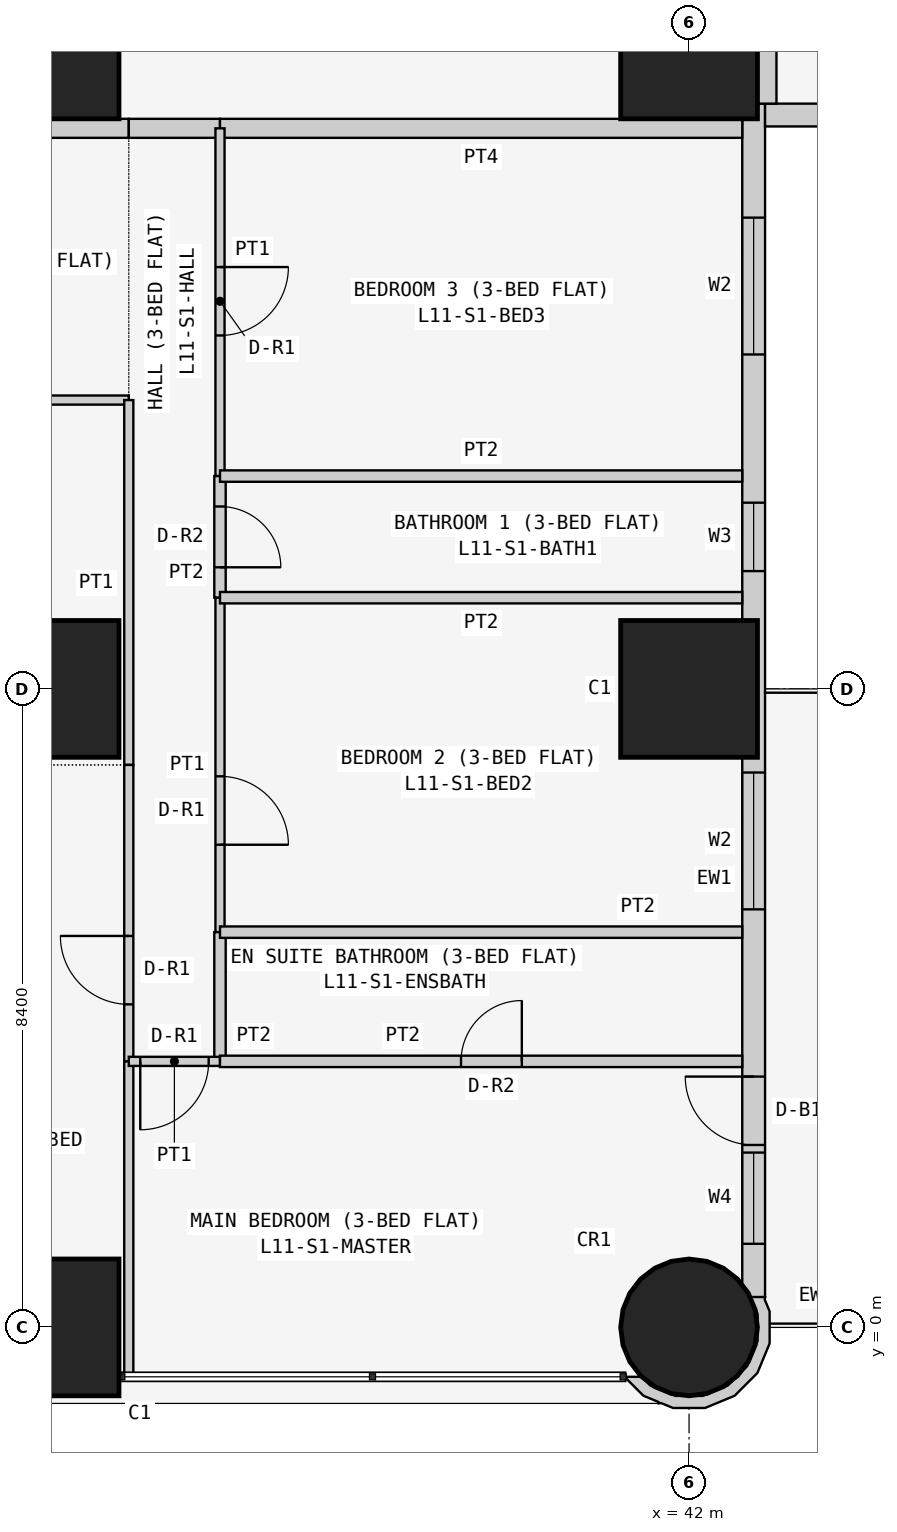
"""IFC4 building model, lengths in metres.
Left out: names, types, materials, properties, quantities, classifications, styles, units other than length and angle.
Written with IfcOpenShell. Run it as: python <this file> out.ifc"""

import sys

from ifc_helpers import new_model, si_unit, direction, frame, frame_2d, origin, origin_2d, place, context, subcontext, project, spatial, polyline, rectangle, circle, outline, extrude, element, fill, save


model = new_model("IFC4")
c1 = context("Model", 3, precision=1e-05, world=origin(), true_north=direction((0.0, 1.0)))
c2 = subcontext(c1, "Body", "Model", "MODEL_VIEW")
j1 = project(units=[si_unit("LENGTHUNIT", "METRE"), si_unit("PLANEANGLEUNIT", "RADIAN")], contexts=[c1])
p1 = place(None, origin())
s1 = spatial("IfcSite", under=j1, at=p1, CompositionType="ELEMENT")
p2 = place(p1, origin())
s2 = spatial("IfcBuilding", under=s1, at=p2, CompositionType="ELEMENT")
p3 = place(p2, frame((0.0, 0.0, 48.9)))
s3 = spatial("IfcBuildingStorey", under=s2, at=p3, CompositionType="ELEMENT", Elevation=48.9)
for number, where, z_axis, x_axis in (
    (1, (33.6, 0.0, 0.0), (0.0, 0.0, 1.0), (1.0, 0.0, 0.0)),
    (2, (33.6, 8.4, 0.0), (0.0, 0.0, 1.0), (1.0, 0.0, 0.0)),
    (3, (33.6, 16.8, 0.0), (0.0, 0.0, 1.0), (1.0, 0.0, 0.0)),
):
    element("IfcColumn", number, at=place(p3, frame(where, z_axis=z_axis, x_axis=x_axis)), inside=s3, PredefinedType="COLUMN", context=c2, shape_type="SweptSolid", body=[
        extrude(rectangle(XDim=1.8, YDim=1.8, at=origin_2d()), origin(), (0.0, 0.0, 1.0), 3.6),
    ])
p4 = place(p3, frame((42.0, 0.0, 0.0), z_axis=(0.0, 0.0, 1.0), x_axis=(1.0, 0.0, 0.0)))
e4 = element("IfcColumn", 4, at=p4, inside=s3, PredefinedType="COLUMN", context=c2, shape_type="SweptSolid", body=[
    extrude(circle(Radius=0.9, at=origin_2d()), origin(), (0.0, 0.0, 1.0), 3.6),
])
for number, where, z_axis, x_axis in (
    (5, (42.0, 8.4, 0.0), (0.0, 0.0, 1.0), (1.0, 0.0, 0.0)),
    (6, (42.0, 16.8, 0.0), (0.0, 0.0, 1.0), (1.0, 0.0, 0.0)),
):
    element("IfcColumn", number, at=place(p3, frame(where, z_axis=z_axis, x_axis=x_axis)), inside=s3, PredefinedType="COLUMN", context=c2, shape_type="SweptSolid", body=[
        extrude(rectangle(XDim=1.8, YDim=1.8, at=origin_2d()), origin(), (0.0, 0.0, 1.0), 3.6),
    ])
p5 = place(p3, frame((42.85, 0.4, 0.0), z_axis=(0.0, 0.0, 1.0), x_axis=(0.0, 1.0, 0.0)))
e7 = element("IfcWall", 7, at=p5, inside=s3, PredefinedType="SOLIDWALL", context=c2, shape_type="SweptSolid", body=[
    extrude(rectangle(XDim=15.7, YDim=0.3, at=frame_2d((7.85, 0.0))), origin(), (0.0, 0.0, 1.0), 3.45),
])
p6 = place(p5, frame((12.4, 0.0, 0.9)))
e8 = element("IfcOpeningElement", 8, at=p6, cuts=e7, PredefinedType="OPENING", context=c2, shape_type="SweptSolid", body=[
    extrude(rectangle(XDim=1.8, YDim=1.5, at=frame_2d((0.9, 0.75))), frame((0.0, 0.16, 0.0), z_axis=(0.0, -1.0, 0.0), x_axis=(1.0, 0.0, 0.0)), (0.0, 0.0, 1.0), 0.32),
])
p7 = place(p5, frame((9.55, 0.0, 1.5)))
e9 = element("IfcOpeningElement", 9, at=p7, cuts=e7, PredefinedType="OPENING", context=c2, shape_type="SweptSolid", body=[
    extrude(rectangle(XDim=0.9, YDim=0.7, at=frame_2d((0.45, 0.35))), frame((0.0, 0.16, 0.0), z_axis=(0.0, -1.0, 0.0), x_axis=(1.0, 0.0, 0.0)), (0.0, 0.0, 1.0), 0.32),
])
p8 = place(p5, frame((5.1, 0.0, 0.9)))
e10 = element("IfcOpeningElement", 10, at=p8, cuts=e7, PredefinedType="OPENING", context=c2, shape_type="SweptSolid", body=[
    extrude(rectangle(XDim=1.8, YDim=1.5, at=frame_2d((0.9, 0.75))), frame((0.0, 0.16, 0.0), z_axis=(0.0, -1.0, 0.0), x_axis=(1.0, 0.0, 0.0)), (0.0, 0.0, 1.0), 0.32),
])
p9 = place(p5, frame((2.0, 0.0, 0.0)))
e11 = element("IfcOpeningElement", 11, at=p9, cuts=e7, PredefinedType="OPENING", context=c2, shape_type="SweptSolid", body=[
    extrude(rectangle(XDim=0.9, YDim=2.4, at=frame_2d((0.45, 1.2))), frame((0.0, 0.16, 0.0), z_axis=(0.0, -1.0, 0.0), x_axis=(1.0, 0.0, 0.0)), (0.0, 0.0, 1.0), 0.32),
])
p10 = place(p5, frame((0.7, 0.0, 0.9)))
e12 = element("IfcOpeningElement", 12, at=p10, cuts=e7, PredefinedType="OPENING", context=c2, shape_type="SweptSolid", body=[
    extrude(rectangle(XDim=1.2, YDim=1.5, at=frame_2d((0.6, 0.75))), frame((0.0, 0.16, 0.0), z_axis=(0.0, -1.0, 0.0), x_axis=(1.0, 0.0, 0.0)), (0.0, 0.0, 1.0), 0.32),
])
p11 = place(p3, frame((43.0, 15.95, 0.0), z_axis=(0.0, 0.0, 1.0), x_axis=(1.0, 0.0, 0.0)))
e13 = element("IfcWall", 13, at=p11, inside=s3, PredefinedType="SOLIDWALL", context=c2, shape_type="SweptSolid", body=[
    extrude(rectangle(XDim=15.4, YDim=0.3, at=frame_2d((7.7, 0.0))), origin(), (0.0, 0.0, 1.0), 3.45),
])
p12 = place(p11, frame((1.2, 0.0, 0.9)))
e14 = element("IfcOpeningElement", 14, at=p12, cuts=e13, PredefinedType="OPENING", context=c2, shape_type="SweptSolid", body=[
    extrude(rectangle(XDim=1.8, YDim=1.5, at=frame_2d((0.9, 0.75))), frame((0.0, 0.16, 0.0), z_axis=(0.0, -1.0, 0.0), x_axis=(1.0, 0.0, 0.0)), (0.0, 0.0, 1.0), 0.32),
])
p13 = place(p11, frame((4.95, 0.0, 1.5)))
e15 = element("IfcOpeningElement", 15, at=p13, cuts=e13, PredefinedType="OPENING", context=c2, shape_type="SweptSolid", body=[
    extrude(rectangle(XDim=0.9, YDim=0.7, at=frame_2d((0.45, 0.35))), frame((0.0, 0.16, 0.0), z_axis=(0.0, -1.0, 0.0), x_axis=(1.0, 0.0, 0.0)), (0.0, 0.0, 1.0), 0.32),
])
p14 = place(p11, frame((8.5, 0.0, 0.9)))
e16 = element("IfcOpeningElement", 16, at=p14, cuts=e13, PredefinedType="OPENING", context=c2, shape_type="SweptSolid", body=[
    extrude(rectangle(XDim=1.8, YDim=1.5, at=frame_2d((0.9, 0.75))), frame((0.0, 0.16, 0.0), z_axis=(0.0, -1.0, 0.0), x_axis=(1.0, 0.0, 0.0)), (0.0, 0.0, 1.0), 0.32),
])
p15 = place(p11, frame((12.5, 0.0, 0.0)))
e17 = element("IfcOpeningElement", 17, at=p15, cuts=e13, PredefinedType="OPENING", context=c2, shape_type="SweptSolid", body=[
    extrude(rectangle(XDim=0.9, YDim=2.4, at=frame_2d((0.45, 1.2))), frame((0.0, 0.16, 0.0), z_axis=(0.0, -1.0, 0.0), x_axis=(1.0, 0.0, 0.0)), (0.0, 0.0, 1.0), 0.32),
])
p16 = place(p11, frame((13.5, 0.0, 0.9)))
e18 = element("IfcOpeningElement", 18, at=p16, cuts=e13, PredefinedType="OPENING", context=c2, shape_type="SweptSolid", body=[
    extrude(rectangle(XDim=1.2, YDim=1.5, at=frame_2d((0.6, 0.75))), frame((0.0, 0.16, 0.0), z_axis=(0.0, -1.0, 0.0), x_axis=(1.0, 0.0, 0.0)), (0.0, 0.0, 1.0), 0.32),
])
p17 = place(p3, frame((41.233, -0.611, 0.0), z_axis=(0.0, 0.0, 1.0), x_axis=(0.377204953059, -0.926129809145, 0.0)))
e19 = element("IfcWall", 19, at=p17, inside=s3, PredefinedType="SOLIDWALL", context=c2, shape_type="SweptSolid", body=[
    extrude(outline(polyline([(0.319, 1.843), (-0.072, 2.001), (-0.24, 2.001), (-0.269, 2.017), (-0.37, 1.841), (-0.102, 1.842), (0.23, 1.707), (0.485, 1.455), (0.624, 1.125), (0.626, 0.766), (0.49, 0.434), (0.239, 0.179), (0.09, 0.117), (0.011, -0.078), (0.024, -0.083), (0.33, 0.045), (0.48, 0.197), (0.499, 0.193), (0.508, 0.225), (0.626, 0.345), (0.785, 0.736), (0.782, 1.157), (0.619, 1.546), (0.319, 1.843)])), origin(), (0.0, 0.0, 1.0), 3.45),
])
p18 = place(p3, frame((43.025, 22.971, 0.0), z_axis=(0.0, 0.0, 1.0), x_axis=(0.0, -1.0, 0.0)))
e20 = element("IfcWall", 20, at=p18, inside=s3, PredefinedType="PARTITIONING", context=c2, shape_type="SweptSolid", body=[
    extrude(rectangle(XDim=6.871, YDim=0.25, at=frame_2d((3.436, 0.0))), origin(), (0.0, 0.0, 1.0), 3.45),
])
p19 = place(p3, frame((34.629, 15.775, 0.0), z_axis=(0.0, 0.0, 1.0), x_axis=(-1.0, 0.0, 0.0)))
e21 = element("IfcWall", 21, at=p19, inside=s3, PredefinedType="PARTITIONING", context=c2, shape_type="SweptSolid", body=[
    extrude(rectangle(XDim=5.229, YDim=0.25, at=frame_2d((2.615, 0.0))), origin(), (0.0, 0.0, 1.0), 3.45),
])
p20 = place(p19, frame((2.129, 0.0, 0.0)))
e22 = element("IfcOpeningElement", 22, at=p20, cuts=e21, PredefinedType="OPENING", context=c2, shape_type="SweptSolid", body=[
    extrude(rectangle(XDim=1.0, YDim=2.1, at=frame_2d((0.5, 1.05))), frame((0.0, 0.135, 0.0), z_axis=(0.0, -1.0, 0.0), x_axis=(1.0, 0.0, 0.0)), (0.0, 0.0, 1.0), 0.27),
])
p21 = place(p3, frame((35.829, 15.775, 0.0), z_axis=(0.0, 0.0, 1.0), x_axis=(-1.0, 0.0, 0.0)))
e23 = element("IfcWall", 23, at=p21, inside=s3, PredefinedType="PARTITIONING", context=c2, shape_type="SweptSolid", body=[
    extrude(rectangle(XDim=1.2, YDim=0.25, at=frame_2d((0.6, 0.0))), origin(), (0.0, 0.0, 1.0), 3.45),
])
p22 = place(p3, frame((42.7, 15.775, 0.0), z_axis=(0.0, 0.0, 1.0), x_axis=(-1.0, 0.0, 0.0)))
e24 = element("IfcWall", 24, at=p22, inside=s3, PredefinedType="PARTITIONING", context=c2, shape_type="SweptSolid", body=[
    extrude(rectangle(XDim=6.871, YDim=0.25, at=frame_2d((3.436, 0.0))), origin(), (0.0, 0.0, 1.0), 3.45),
])
p23 = place(p3, frame((29.4, 12.2, 0.0), z_axis=(0.0, 0.0, 1.0), x_axis=(1.0, 0.0, 0.0)))
e25 = element("IfcWall", 25, at=p23, inside=s3, PredefinedType="PARTITIONING", context=c2, shape_type="SweptSolid", body=[
    extrude(rectangle(XDim=5.229, YDim=0.12, at=frame_2d((2.615, 0.0))), origin(), (0.0, 0.0, 1.0), 3.45),
])
p24 = place(p23, frame((1.05, 0.0, 0.0)))
e26 = element("IfcOpeningElement", 26, at=p24, cuts=e25, PredefinedType="OPENING", context=c2, shape_type="SweptSolid", body=[
    extrude(rectangle(XDim=0.9, YDim=2.1, at=frame_2d((0.45, 1.05))), frame((0.0, 0.07, 0.0), z_axis=(0.0, -1.0, 0.0), x_axis=(1.0, 0.0, 0.0)), (0.0, 0.0, 1.0), 0.14),
])
p25 = place(p3, frame((34.629, 7.4, 0.0), z_axis=(0.0, 0.0, 1.0), x_axis=(0.0, 1.0, 0.0)))
e27 = element("IfcWall", 27, at=p25, inside=s3, PredefinedType="PARTITIONING", context=c2, shape_type="SweptSolid", body=[
    extrude(rectangle(XDim=4.8, YDim=0.12, at=frame_2d((2.4, 0.0))), origin(), (0.0, 0.0, 1.0), 3.45),
])
p26 = place(p3, frame((34.629, 3.5, 0.0), z_axis=(0.0, 0.0, 1.0), x_axis=(0.0, 1.0, 0.0)))
e28 = element("IfcWall", 28, at=p26, inside=s3, PredefinedType="PARTITIONING", context=c2, shape_type="SweptSolid", body=[
    extrude(rectangle(XDim=3.9, YDim=0.12, at=frame_2d((1.95, 0.0))), origin(), (0.0, 0.0, 1.0), 3.45),
])
p27 = place(p26, frame((0.75, 0.0, 0.0)))
e29 = element("IfcOpeningElement", 29, at=p27, cuts=e28, PredefinedType="OPENING", context=c2, shape_type="SweptSolid", body=[
    extrude(rectangle(XDim=0.9, YDim=2.1, at=frame_2d((0.45, 1.05))), frame((0.0, 0.07, 0.0), z_axis=(0.0, -1.0, 0.0), x_axis=(1.0, 0.0, 0.0)), (0.0, 0.0, 1.0), 0.14),
])
p28 = place(p3, frame((34.629, -0.65, 0.0), z_axis=(0.0, 0.0, 1.0), x_axis=(0.0, 1.0, 0.0)))
e30 = element("IfcWall", 30, at=p28, inside=s3, PredefinedType="PARTITIONING", context=c2, shape_type="SweptSolid", body=[
    extrude(rectangle(XDim=4.15, YDim=0.12, at=frame_2d((2.075, 0.0))), origin(), (0.0, 0.0, 1.0), 3.45),
])
p29 = place(p3, frame((35.829, 11.2, 0.0), z_axis=(0.0, 0.0, 1.0), x_axis=(0.0, 1.0, 0.0)))
e31 = element("IfcWall", 31, at=p29, inside=s3, PredefinedType="PARTITIONING", context=c2, shape_type="SweptSolid", body=[
    extrude(rectangle(XDim=4.575, YDim=0.12, at=frame_2d((2.288, 0.0))), origin(), (0.0, 0.0, 1.0), 3.45),
])
p30 = place(p29, frame((1.85, 0.0, 0.0)))
e32 = element("IfcOpeningElement", 32, at=p30, cuts=e31, PredefinedType="OPENING", context=c2, shape_type="SweptSolid", body=[
    extrude(rectangle(XDim=0.9, YDim=2.1, at=frame_2d((0.45, 1.05))), frame((0.0, 0.07, 0.0), z_axis=(0.0, -1.0, 0.0), x_axis=(1.0, 0.0, 0.0)), (0.0, 0.0, 1.0), 0.14),
])
p31 = place(p3, frame((35.829, 9.6, 0.0), z_axis=(0.0, 0.0, 1.0), x_axis=(0.0, 1.0, 0.0)))
e33 = element("IfcWall", 33, at=p31, inside=s3, PredefinedType="PARTITIONING", context=c2, shape_type="SweptSolid", body=[
    extrude(rectangle(XDim=1.6, YDim=0.15, at=frame_2d((0.8, 0.0))), origin(), (0.0, 0.0, 1.0), 3.45),
])
p32 = place(p31, frame((0.4, 0.0, 0.0)))
e34 = element("IfcOpeningElement", 34, at=p32, cuts=e33, PredefinedType="OPENING", context=c2, shape_type="SweptSolid", body=[
    extrude(rectangle(XDim=0.8, YDim=2.1, at=frame_2d((0.4, 1.05))), frame((0.0, 0.085, 0.0), z_axis=(0.0, -1.0, 0.0), x_axis=(1.0, 0.0, 0.0)), (0.0, 0.0, 1.0), 0.17),
])
p33 = place(p3, frame((35.829, 5.2, 0.0), z_axis=(0.0, 0.0, 1.0), x_axis=(0.0, 1.0, 0.0)))
e35 = element("IfcWall", 35, at=p33, inside=s3, PredefinedType="PARTITIONING", context=c2, shape_type="SweptSolid", body=[
    extrude(rectangle(XDim=4.4, YDim=0.12, at=frame_2d((2.2, 0.0))), origin(), (0.0, 0.0, 1.0), 3.45),
])
p34 = place(p33, frame((1.15, 0.0, 0.0)))
e36 = element("IfcOpeningElement", 36, at=p34, cuts=e35, PredefinedType="OPENING", context=c2, shape_type="SweptSolid", body=[
    extrude(rectangle(XDim=0.9, YDim=2.1, at=frame_2d((0.45, 1.05))), frame((0.0, 0.07, 0.0), z_axis=(0.0, -1.0, 0.0), x_axis=(1.0, 0.0, 0.0)), (0.0, 0.0, 1.0), 0.14),
])
p35 = place(p3, frame((35.829, 3.5, 0.0), z_axis=(0.0, 0.0, 1.0), x_axis=(0.0, 1.0, 0.0)))
e37 = element("IfcWall", 37, at=p35, inside=s3, PredefinedType="PARTITIONING", context=c2, shape_type="SweptSolid", body=[
    extrude(rectangle(XDim=1.7, YDim=0.15, at=frame_2d((0.85, 0.0))), origin(), (0.0, 0.0, 1.0), 3.45),
])
p36 = place(p3, frame((34.629, 3.5, 0.0), z_axis=(0.0, 0.0, 1.0), x_axis=(1.0, 0.0, 0.0)))
e38 = element("IfcWall", 38, at=p36, inside=s3, PredefinedType="PARTITIONING", context=c2, shape_type="SweptSolid", body=[
    extrude(rectangle(XDim=1.2, YDim=0.12, at=frame_2d((0.6, 0.0))), origin(), (0.0, 0.0, 1.0), 3.45),
])
p37 = place(p36, frame((0.151, 0.0, 0.0)))
e39 = element("IfcOpeningElement", 39, at=p37, cuts=e38, PredefinedType="OPENING", context=c2, shape_type="SweptSolid", body=[
    extrude(rectangle(XDim=0.9, YDim=2.1, at=frame_2d((0.45, 1.05))), frame((0.0, 0.07, 0.0), z_axis=(0.0, -1.0, 0.0), x_axis=(1.0, 0.0, 0.0)), (0.0, 0.0, 1.0), 0.14),
])
for number, where, z_axis, x_axis in (
    (40, (35.829, 11.2, 0.0), (0.0, 0.0, 1.0), (1.0, 0.0, 0.0)),
    (41, (35.829, 9.6, 0.0), (0.0, 0.0, 1.0), (1.0, 0.0, 0.0)),
    (42, (35.829, 5.2, 0.0), (0.0, 0.0, 1.0), (1.0, 0.0, 0.0)),
):
    element("IfcWall", number, at=place(p3, frame(where, z_axis=z_axis, x_axis=x_axis)), inside=s3, PredefinedType="PARTITIONING", context=c2, shape_type="SweptSolid", body=[
        extrude(rectangle(XDim=6.871, YDim=0.15, at=frame_2d((3.436, 0.0))), origin(), (0.0, 0.0, 1.0), 3.45),
    ])
p38 = place(p3, frame((35.829, 3.5, 0.0), z_axis=(0.0, 0.0, 1.0), x_axis=(1.0, 0.0, 0.0)))
e43 = element("IfcWall", 43, at=p38, inside=s3, PredefinedType="PARTITIONING", context=c2, shape_type="SweptSolid", body=[
    extrude(rectangle(XDim=6.871, YDim=0.15, at=frame_2d((3.436, 0.0))), origin(), (0.0, 0.0, 1.0), 3.45),
])
p39 = place(p38, frame((3.171, 0.0, 0.0)))
e44 = element("IfcOpeningElement", 44, at=p39, cuts=e43, PredefinedType="OPENING", context=c2, shape_type="SweptSolid", body=[
    extrude(rectangle(XDim=0.8, YDim=2.1, at=frame_2d((0.4, 1.05))), frame((0.0, 0.085, 0.0), z_axis=(0.0, -1.0, 0.0), x_axis=(1.0, 0.0, 0.0)), (0.0, 0.0, 1.0), 0.17),
])
p40 = place(p6, origin())
e45 = element("IfcWindow", 45, at=p40, inside=s3, PartitioningType="SINGLE_PANEL", PredefinedType="WINDOW", context=c2, shape_type="SweptSolid", body=[
    extrude(rectangle(XDim=1.8, YDim=1.5, at=frame_2d((0.9, 0.75))), frame((0.0, 0.03, 0.0), z_axis=(0.0, -1.0, 0.0), x_axis=(1.0, 0.0, 0.0)), (0.0, 0.0, 1.0), 0.06),
])
fill(e8, e45)
p41 = place(p7, origin())
e46 = element("IfcWindow", 46, at=p41, inside=s3, PartitioningType="SINGLE_PANEL", PredefinedType="WINDOW", context=c2, shape_type="SweptSolid", body=[
    extrude(rectangle(XDim=0.9, YDim=0.7, at=frame_2d((0.45, 0.35))), frame((0.0, 0.03, 0.0), z_axis=(0.0, -1.0, 0.0), x_axis=(1.0, 0.0, 0.0)), (0.0, 0.0, 1.0), 0.06),
])
fill(e9, e46)
p42 = place(p8, origin())
e47 = element("IfcWindow", 47, at=p42, inside=s3, PartitioningType="SINGLE_PANEL", PredefinedType="WINDOW", context=c2, shape_type="SweptSolid", body=[
    extrude(rectangle(XDim=1.8, YDim=1.5, at=frame_2d((0.9, 0.75))), frame((0.0, 0.03, 0.0), z_axis=(0.0, -1.0, 0.0), x_axis=(1.0, 0.0, 0.0)), (0.0, 0.0, 1.0), 0.06),
])
fill(e10, e47)
p43 = place(p9, origin())
e48 = element("IfcDoor", 48, at=p43, inside=s3, OperationType="SINGLE_SWING_RIGHT", PredefinedType="DOOR", context=c2, shape_type="SweptSolid", body=[
    extrude(rectangle(XDim=0.9, YDim=2.4, at=frame_2d((0.45, 1.2))), frame((0.0, 0.025, 0.0), z_axis=(0.0, -1.0, 0.0), x_axis=(1.0, 0.0, 0.0)), (0.0, 0.0, 1.0), 0.05),
])
fill(e11, e48)
p44 = place(p10, origin())
e49 = element("IfcWindow", 49, at=p44, inside=s3, PartitioningType="SINGLE_PANEL", PredefinedType="WINDOW", context=c2, shape_type="SweptSolid", body=[
    extrude(rectangle(XDim=1.2, YDim=1.5, at=frame_2d((0.6, 0.75))), frame((0.0, 0.03, 0.0), z_axis=(0.0, -1.0, 0.0), x_axis=(1.0, 0.0, 0.0)), (0.0, 0.0, 1.0), 0.06),
])
fill(e12, e49)
p45 = place(p27, origin())
e50 = element("IfcDoor", 50, at=p45, inside=s3, OperationType="SINGLE_SWING_RIGHT", PredefinedType="DOOR", context=c2, shape_type="SweptSolid", body=[
    extrude(rectangle(XDim=0.9, YDim=2.1, at=frame_2d((0.45, 1.05))), frame((0.0, 0.025, 0.0), z_axis=(0.0, -1.0, 0.0), x_axis=(1.0, 0.0, 0.0)), (0.0, 0.0, 1.0), 0.05),
])
fill(e29, e50)
p46 = place(p30, frame((0.9, 0.0, 0.0), z_axis=(0.0, 0.0, 1.0), x_axis=(-1.0, 0.0, 0.0)))
e51 = element("IfcDoor", 51, at=p46, inside=s3, OperationType="SINGLE_SWING_LEFT", PredefinedType="DOOR", context=c2, shape_type="SweptSolid", body=[
    extrude(rectangle(XDim=0.9, YDim=2.1, at=frame_2d((0.45, 1.05))), frame((0.0, 0.025, 0.0), z_axis=(0.0, -1.0, 0.0), x_axis=(1.0, 0.0, 0.0)), (0.0, 0.0, 1.0), 0.05),
])
fill(e32, e51)
p47 = place(p32, frame((0.8, 0.0, 0.0), z_axis=(0.0, 0.0, 1.0), x_axis=(-1.0, 0.0, 0.0)))
e52 = element("IfcDoor", 52, at=p47, inside=s3, OperationType="SINGLE_SWING_RIGHT", PredefinedType="DOOR", context=c2, shape_type="SweptSolid", body=[
    extrude(rectangle(XDim=0.8, YDim=2.1, at=frame_2d((0.4, 1.05))), frame((0.0, 0.025, 0.0), z_axis=(0.0, -1.0, 0.0), x_axis=(1.0, 0.0, 0.0)), (0.0, 0.0, 1.0), 0.05),
])
fill(e34, e52)
p48 = place(p34, frame((0.9, 0.0, 0.0), z_axis=(0.0, 0.0, 1.0), x_axis=(-1.0, 0.0, 0.0)))
e53 = element("IfcDoor", 53, at=p48, inside=s3, OperationType="SINGLE_SWING_RIGHT", PredefinedType="DOOR", context=c2, shape_type="SweptSolid", body=[
    extrude(rectangle(XDim=0.9, YDim=2.1, at=frame_2d((0.45, 1.05))), frame((0.0, 0.025, 0.0), z_axis=(0.0, -1.0, 0.0), x_axis=(1.0, 0.0, 0.0)), (0.0, 0.0, 1.0), 0.05),
])
fill(e36, e53)
p49 = place(p37, frame((0.9, 0.0, 0.0), z_axis=(0.0, 0.0, 1.0), x_axis=(-1.0, 0.0, 0.0)))
e54 = element("IfcDoor", 54, at=p49, inside=s3, OperationType="SINGLE_SWING_RIGHT", PredefinedType="DOOR", context=c2, shape_type="SweptSolid", body=[
    extrude(rectangle(XDim=0.9, YDim=2.1, at=frame_2d((0.45, 1.05))), frame((0.0, 0.025, 0.0), z_axis=(0.0, -1.0, 0.0), x_axis=(1.0, 0.0, 0.0)), (0.0, 0.0, 1.0), 0.05),
])
fill(e39, e54)
p50 = place(p39, origin())
e55 = element("IfcDoor", 55, at=p50, inside=s3, OperationType="SINGLE_SWING_RIGHT", PredefinedType="DOOR", context=c2, shape_type="SweptSolid", body=[
    extrude(rectangle(XDim=0.8, YDim=2.1, at=frame_2d((0.4, 1.05))), frame((0.0, 0.025, 0.0), z_axis=(0.0, -1.0, 0.0), x_axis=(1.0, 0.0, 0.0)), (0.0, 0.0, 1.0), 0.05),
])
fill(e44, e55)
save(model, sys.argv[1])
